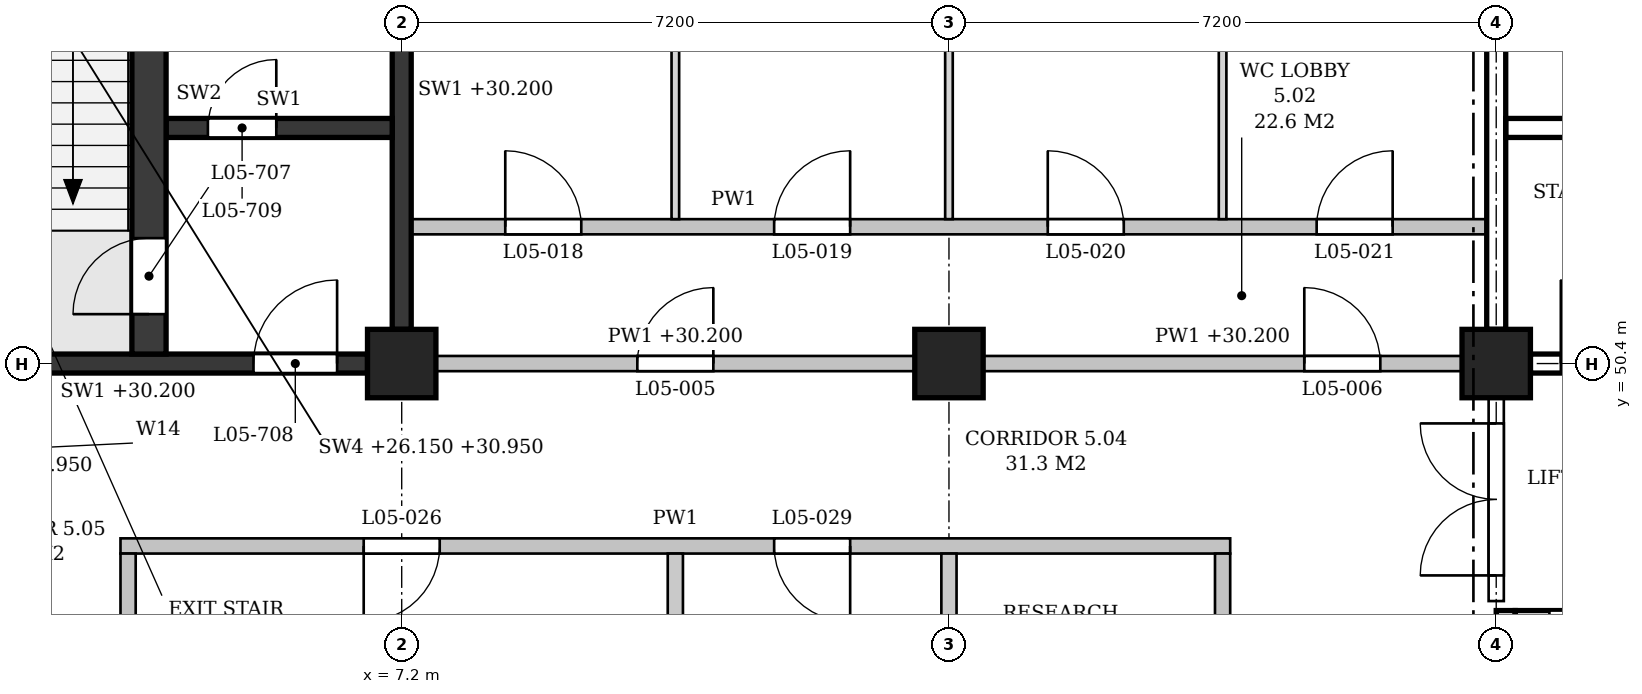
"""IFC4 building model, lengths in metres.
Left out: names, types, materials, properties, quantities, classifications, styles, units other than length and angle.
Written with IfcOpenShell. Run it as: python <this file> out.ifc"""

import sys

from ifc_helpers import new_model, si_unit, direction, frame, frame_2d, origin, origin_2d, place, context, subcontext, project, spatial, polyline, rectangle, outline, extrude, element, fill, save


model = new_model("IFC4")
c1 = context("Model", 3, precision=1e-05, world=origin(), true_north=direction((0.0, 1.0)))
c2 = subcontext(c1, "Body", "Model", "MODEL_VIEW")
j1 = project(units=[si_unit("LENGTHUNIT", "METRE"), si_unit("PLANEANGLEUNIT", "RADIAN")], contexts=[c1])
p1 = place(None, origin())
s1 = spatial("IfcSite", under=j1, at=p1, CompositionType="ELEMENT")
p2 = place(p1, origin())
s2 = spatial("IfcBuilding", under=s1, at=p2, CompositionType="ELEMENT")
p3 = place(p2, frame((0.0, 0.0, 26.4)))
s3 = spatial("IfcBuildingStorey", under=s2, at=p3, CompositionType="ELEMENT", Elevation=26.4)
for number, where, z_axis, x_axis in (
    (1, (7.2, 50.4, 0.0), (0.0, 0.0, 1.0), (1.0, 0.0, 0.0)),
    (2, (14.4, 50.4, 0.0), (0.0, 0.0, 1.0), (1.0, 0.0, 0.0)),
    (3, (21.6, 50.4, 0.0), (0.0, 0.0, 1.0), (1.0, 0.0, 0.0)),
):
    element("IfcColumn", number, at=place(p3, frame(where, z_axis=z_axis, x_axis=x_axis)), inside=s3, PredefinedType="COLUMN", context=c2, shape_type="SweptSolid", body=[
        extrude(rectangle(XDim=0.9, YDim=0.9, at=origin_2d()), origin(), (0.0, 0.0, 1.0), 4.8),
    ])
p4 = place(p3, frame((0.45, 50.4, 0.0), z_axis=(0.0, 0.0, 1.0), x_axis=(1.0, 0.0, 0.0)))
e4 = element("IfcWall", 4, at=p4, inside=s3, PredefinedType="SHEAR", context=c2, shape_type="SweptSolid", body=[
    extrude(rectangle(XDim=6.3, YDim=0.25, at=frame_2d((3.15, 0.0))), origin(), (0.0, 0.0, 1.0), 3.8),
])
p5 = place(p4, frame((4.8, 0.0, 0.0)))
e5 = element("IfcOpeningElement", 5, at=p5, cuts=e4, PredefinedType="OPENING", context=c2, shape_type="SweptSolid", body=[
    extrude(rectangle(XDim=1.1, YDim=2.1, at=frame_2d((0.55, 1.05))), frame((0.0, 0.135, 0.0), z_axis=(0.0, -1.0, 0.0), x_axis=(1.0, 0.0, 0.0)), (0.0, 0.0, 1.0), 0.27),
])
p6 = place(p3, frame((7.2, 50.85, 0.0), z_axis=(0.0, 0.0, 1.0), x_axis=(0.0, 1.0, 0.0)))
e6 = element("IfcWall", 6, at=p6, inside=s3, PredefinedType="SHEAR", context=c2, shape_type="SweptSolid", body=[
    extrude(rectangle(XDim=6.3, YDim=0.25, at=frame_2d((3.15, 0.0))), origin(), (0.0, 0.0, 1.0), 3.8),
])
p7 = place(p3, frame((3.875, 50.525, 0.0), z_axis=(0.0, 0.0, 1.0), x_axis=(0.0, 1.0, 0.0)))
e7 = element("IfcWall", 7, at=p7, inside=s3, PredefinedType="SHEAR", context=c2, shape_type="SweptSolid", body=[
    extrude(rectangle(XDim=6.85, YDim=0.45, at=frame_2d((3.425, 0.0))), origin(), (0.0, 0.0, 1.0), 4.55),
])
p8 = place(p7, frame((0.525, 0.0, 0.0)))
e8 = element("IfcOpeningElement", 8, at=p8, cuts=e7, PredefinedType="OPENING", context=c2, shape_type="SweptSolid", body=[
    extrude(rectangle(XDim=1.0, YDim=2.1, at=frame_2d((0.5, 1.05))), frame((0.0, 0.235, 0.0), z_axis=(0.0, -1.0, 0.0), x_axis=(1.0, 0.0, 0.0)), (0.0, 0.0, 1.0), 0.47),
])
p9 = place(p3, frame((4.1, 53.5, 0.0), z_axis=(0.0, 0.0, 1.0), x_axis=(1.0, 0.0, 0.0)))
e9 = element("IfcWall", 9, at=p9, inside=s3, PredefinedType="SHEAR", context=c2, shape_type="SweptSolid", body=[
    extrude(rectangle(XDim=2.975, YDim=0.25, at=frame_2d((1.487, 0.0))), origin(), (0.0, 0.0, 1.0), 4.55),
])
p10 = place(p9, frame((0.55, 0.0, 0.0)))
e10 = element("IfcOpeningElement", 10, at=p10, cuts=e9, PredefinedType="OPENING", context=c2, shape_type="SweptSolid", body=[
    extrude(rectangle(XDim=0.9, YDim=2.1, at=frame_2d((0.45, 1.05))), frame((0.0, 0.135, 0.0), z_axis=(0.0, -1.0, 0.0), x_axis=(1.0, 0.0, 0.0)), (0.0, 0.0, 1.0), 0.27),
])
p11 = place(p3, frame((22.05, 50.4, 0.0), z_axis=(0.0, 0.0, 1.0), x_axis=(1.0, 0.0, 0.0)))
e11 = element("IfcWall", 11, at=p11, inside=s3, PredefinedType="SHEAR", context=c2, shape_type="SweptSolid", body=[
    extrude(rectangle(XDim=6.3, YDim=0.25, at=frame_2d((3.15, 0.0))), origin(), (0.0, 0.0, 1.0), 3.8),
])
p12 = place(p11, frame((0.4, 0.0, 0.0)))
e12 = element("IfcOpeningElement", 12, at=p12, cuts=e11, PredefinedType="OPENING", context=c2, shape_type="SweptSolid", body=[
    extrude(rectangle(XDim=1.1, YDim=2.1, at=frame_2d((0.55, 1.05))), frame((0.0, 0.135, 0.0), z_axis=(0.0, -1.0, 0.0), x_axis=(1.0, 0.0, 0.0)), (0.0, 0.0, 1.0), 0.27),
])
p13 = place(p3, frame((21.6, 50.85, 0.0), z_axis=(0.0, 0.0, 1.0), x_axis=(0.0, 1.0, 0.0)))
e13 = element("IfcWall", 13, at=p13, inside=s3, PredefinedType="SHEAR", context=c2, shape_type="SweptSolid", body=[
    extrude(rectangle(XDim=6.3, YDim=0.25, at=frame_2d((3.15, 0.0))), origin(), (0.0, 0.0, 1.0), 3.8),
])
p14 = place(p3, frame((21.725, 53.5, 0.0), z_axis=(0.0, 0.0, 1.0), x_axis=(1.0, 0.0, 0.0)))
e14 = element("IfcWall", 14, at=p14, inside=s3, PredefinedType="SHEAR", context=c2, shape_type="SweptSolid", body=[
    extrude(rectangle(XDim=2.975, YDim=0.25, at=frame_2d((1.487, 0.0))), origin(), (0.0, 0.0, 1.0), 4.55),
])
p15 = place(p14, frame((1.525, 0.0, 0.0)))
e15 = element("IfcOpeningElement", 15, at=p15, cuts=e14, PredefinedType="OPENING", context=c2, shape_type="SweptSolid", body=[
    extrude(rectangle(XDim=0.9, YDim=2.1, at=frame_2d((0.45, 1.05))), frame((0.0, 0.135, 0.0), z_axis=(0.0, -1.0, 0.0), x_axis=(1.0, 0.0, 0.0)), (0.0, 0.0, 1.0), 0.27),
])
p16 = place(p3, frame((21.725, 43.65, -0.25), z_axis=(0.0, 0.0, 1.0), x_axis=(0.0, 1.0, 0.0)))
e16 = element("IfcWall", 16, at=p16, inside=s3, PredefinedType="SHEAR", context=c2, shape_type="SweptSolid", body=[
    extrude(rectangle(XDim=3.5, YDim=0.25, at=frame_2d((1.75, 0.0))), origin(), (0.0, 0.0, 1.0), 4.05),
])
p17 = place(p3, frame((21.85, 47.025, -0.25), z_axis=(0.0, 0.0, 1.0), x_axis=(1.0, 0.0, 0.0)))
e17 = element("IfcWall", 17, at=p17, inside=s3, PredefinedType="SHEAR", context=c2, shape_type="SweptSolid", body=[
    extrude(rectangle(XDim=2.0, YDim=0.25, at=frame_2d((1.0, 0.0))), origin(), (0.0, 0.0, 1.0), 4.8),
])
p18 = place(p17, frame((0.45, 0.0, 0.25)))
e18 = element("IfcOpeningElement", 18, at=p18, cuts=e17, PredefinedType="OPENING", context=c2, shape_type="SweptSolid", body=[
    extrude(rectangle(XDim=1.1, YDim=2.1, at=frame_2d((0.55, 1.05))), frame((0.0, 0.135, 0.0), z_axis=(0.0, -1.0, 0.0), x_axis=(1.0, 0.0, 0.0)), (0.0, 0.0, 1.0), 0.27),
])
p19 = place(p3, frame((3.5, 48.0, 0.0), z_axis=(0.0, 0.0, 1.0), x_axis=(1.0, 0.0, 0.0)))
e19 = element("IfcWall", 19, at=p19, inside=s3, PredefinedType="PARTITIONING", context=c2, shape_type="SweptSolid", body=[
    extrude(outline(polyline([(0.0, 0.0), (14.6, 0.0), (14.6, 4.55), (11.15, 4.55), (11.15, 3.8), (10.65, 3.8), (10.65, 4.55), (3.95, 4.55), (3.95, 3.8), (3.45, 3.8), (3.45, 4.55), (0.0, 4.55), (0.0, 0.0)])), frame((0.0, 0.1, 0.0), z_axis=(0.0, -1.0, 0.0), x_axis=(1.0, 0.0, 0.0)), (0.0, 0.0, 1.0), 0.2),
])
p20 = place(p19, frame((3.2, 0.0, 0.0)))
e20 = element("IfcOpeningElement", 20, at=p20, cuts=e19, PredefinedType="OPENING", context=c2, shape_type="SweptSolid", body=[
    extrude(rectangle(XDim=1.0, YDim=2.1, at=frame_2d((0.5, 1.05))), frame((0.0, 0.11, 0.0), z_axis=(0.0, -1.0, 0.0), x_axis=(1.0, 0.0, 0.0)), (0.0, 0.0, 1.0), 0.22),
])
p21 = place(p19, frame((8.6, 0.0, 0.0)))
e21 = element("IfcOpeningElement", 21, at=p21, cuts=e19, PredefinedType="OPENING", context=c2, shape_type="SweptSolid", body=[
    extrude(rectangle(XDim=1.0, YDim=2.1, at=frame_2d((0.5, 1.05))), frame((0.0, 0.11, 0.0), z_axis=(0.0, -1.0, 0.0), x_axis=(1.0, 0.0, 0.0)), (0.0, 0.0, 1.0), 0.22),
])
p22 = place(p3, frame((7.65, 50.4, 0.0), z_axis=(0.0, 0.0, 1.0), x_axis=(1.0, 0.0, 0.0)))
e22 = element("IfcWall", 22, at=p22, inside=s3, PredefinedType="PARTITIONING", context=c2, shape_type="SweptSolid", body=[
    extrude(rectangle(XDim=6.3, YDim=0.2, at=frame_2d((3.15, 0.0))), origin(), (0.0, 0.0, 1.0), 3.8),
])
p23 = place(p22, frame((2.65, 0.0, 0.0)))
e23 = element("IfcOpeningElement", 23, at=p23, cuts=e22, PredefinedType="OPENING", context=c2, shape_type="SweptSolid", body=[
    extrude(rectangle(XDim=1.0, YDim=2.1, at=frame_2d((0.5, 1.05))), frame((0.0, 0.11, 0.0), z_axis=(0.0, -1.0, 0.0), x_axis=(1.0, 0.0, 0.0)), (0.0, 0.0, 1.0), 0.22),
])
p24 = place(p3, frame((14.85, 50.4, 0.0), z_axis=(0.0, 0.0, 1.0), x_axis=(1.0, 0.0, 0.0)))
e24 = element("IfcWall", 24, at=p24, inside=s3, PredefinedType="PARTITIONING", context=c2, shape_type="SweptSolid", body=[
    extrude(rectangle(XDim=6.3, YDim=0.2, at=frame_2d((3.15, 0.0))), origin(), (0.0, 0.0, 1.0), 3.8),
])
p25 = place(p24, frame((4.225, 0.0, 0.0)))
e25 = element("IfcOpeningElement", 25, at=p25, cuts=e24, PredefinedType="OPENING", context=c2, shape_type="SweptSolid", body=[
    extrude(rectangle(XDim=1.0, YDim=2.1, at=frame_2d((0.5, 1.05))), frame((0.0, 0.11, 0.0), z_axis=(0.0, -1.0, 0.0), x_axis=(1.0, 0.0, 0.0)), (0.0, 0.0, 1.0), 0.22),
])
p26 = place(p3, frame((7.325, 52.2, 0.0), z_axis=(0.0, 0.0, 1.0), x_axis=(1.0, 0.0, 0.0)))
e26 = element("IfcWall", 26, at=p26, inside=s3, PredefinedType="PARTITIONING", context=c2, shape_type="SweptSolid", body=[
    extrude(outline(polyline([(0.0, 0.0), (14.15, 0.0), (14.15, 3.8), (14.025, 3.8), (14.025, 4.55), (7.325, 4.55), (7.325, 3.8), (6.825, 3.8), (6.825, 4.55), (0.125, 4.55), (0.125, 3.8), (0.0, 3.8), (0.0, 0.0)])), frame((0.0, 0.1, 0.0), z_axis=(0.0, -1.0, 0.0), x_axis=(1.0, 0.0, 0.0)), (0.0, 0.0, 1.0), 0.2),
])
p27 = place(p26, frame((1.238, 0.0, 0.0)))
e27 = element("IfcOpeningElement", 27, at=p27, cuts=e26, PredefinedType="OPENING", context=c2, shape_type="SweptSolid", body=[
    extrude(rectangle(XDim=1.0, YDim=2.1, at=frame_2d((0.5, 1.05))), frame((0.0, 0.11, 0.0), z_axis=(0.0, -1.0, 0.0), x_axis=(1.0, 0.0, 0.0)), (0.0, 0.0, 1.0), 0.22),
])
p28 = place(p26, frame((4.775, 0.0, 0.0)))
e28 = element("IfcOpeningElement", 28, at=p28, cuts=e26, PredefinedType="OPENING", context=c2, shape_type="SweptSolid", body=[
    extrude(rectangle(XDim=1.0, YDim=2.1, at=frame_2d((0.5, 1.05))), frame((0.0, 0.11, 0.0), z_axis=(0.0, -1.0, 0.0), x_axis=(1.0, 0.0, 0.0)), (0.0, 0.0, 1.0), 0.22),
])
p29 = place(p26, frame((8.375, 0.0, 0.0)))
e29 = element("IfcOpeningElement", 29, at=p29, cuts=e26, PredefinedType="OPENING", context=c2, shape_type="SweptSolid", body=[
    extrude(rectangle(XDim=1.0, YDim=2.1, at=frame_2d((0.5, 1.05))), frame((0.0, 0.11, 0.0), z_axis=(0.0, -1.0, 0.0), x_axis=(1.0, 0.0, 0.0)), (0.0, 0.0, 1.0), 0.22),
])
p30 = place(p26, frame((11.913, 0.0, 0.0)))
e30 = element("IfcOpeningElement", 30, at=p30, cuts=e26, PredefinedType="OPENING", context=c2, shape_type="SweptSolid", body=[
    extrude(rectangle(XDim=1.0, YDim=2.1, at=frame_2d((0.5, 1.05))), frame((0.0, 0.11, 0.0), z_axis=(0.0, -1.0, 0.0), x_axis=(1.0, 0.0, 0.0)), (0.0, 0.0, 1.0), 0.22),
])
p31 = place(p3, frame((3.6, 46.8, 0.0), z_axis=(0.0, 0.0, 1.0), x_axis=(0.0, 1.0, 0.0)))
e31 = element("IfcWall", 31, at=p31, inside=s3, PredefinedType="PARTITIONING", context=c2, shape_type="SweptSolid", body=[
    extrude(rectangle(XDim=1.1, YDim=0.2, at=frame_2d((0.55, 0.0))), origin(), (0.0, 0.0, 1.0), 4.55),
])
p32 = place(p3, frame((10.8, 36.15, 0.0), z_axis=(0.0, 0.0, 1.0), x_axis=(0.0, 1.0, 0.0)))
e32 = element("IfcWall", 32, at=p32, inside=s3, PredefinedType="PARTITIONING", context=c2, shape_type="SweptSolid", body=[
    extrude(outline(polyline([(0.0, 0.0), (11.75, 0.0), (11.75, 4.55), (7.3, 4.55), (7.3, 3.8), (6.8, 3.8), (6.8, 4.55), (0.1, 4.55), (0.1, 3.95), (0.0, 3.95), (0.0, 0.0)])), frame((0.0, 0.1, 0.0), z_axis=(0.0, -1.0, 0.0), x_axis=(1.0, 0.0, 0.0)), (0.0, 0.0, 1.0), 0.2),
])
p33 = place(p3, frame((10.8, 52.3, 0.0), z_axis=(0.0, 0.0, 1.0), x_axis=(0.0, 1.0, 0.0)))
e33 = element("IfcWall", 33, at=p33, inside=s3, PredefinedType="PARTITIONING", context=c2, shape_type="SweptSolid", body=[
    extrude(rectangle(XDim=5.15, YDim=0.1, at=frame_2d((2.575, 0.0))), origin(), (0.0, 0.0, 1.0), 3.8),
])
p34 = place(p3, frame((14.4, 43.65, 0.0), z_axis=(0.0, 0.0, 1.0), x_axis=(0.0, 1.0, 0.0)))
e34 = element("IfcWall", 34, at=p34, inside=s3, PredefinedType="PARTITIONING", context=c2, shape_type="SweptSolid", body=[
    extrude(rectangle(XDim=4.25, YDim=0.2, at=frame_2d((2.125, 0.0))), origin(), (0.0, 0.0, 1.0), 3.8),
])
p35 = place(p3, frame((14.4, 52.3, 0.0), z_axis=(0.0, 0.0, 1.0), x_axis=(0.0, 1.0, 0.0)))
e35 = element("IfcWall", 35, at=p35, inside=s3, PredefinedType="PARTITIONING", context=c2, shape_type="SweptSolid", body=[
    extrude(rectangle(XDim=4.85, YDim=0.1, at=frame_2d((2.425, 0.0))), origin(), (0.0, 0.0, 1.0), 3.8),
])
p36 = place(p3, frame((18.0, 40.9, 0.0), z_axis=(0.0, 0.0, 1.0), x_axis=(0.0, 1.0, 0.0)))
e36 = element("IfcWall", 36, at=p36, inside=s3, PredefinedType="PARTITIONING", context=c2, shape_type="SweptSolid", body=[
    extrude(outline(polyline([(0.0, 0.0), (7.0, 0.0), (7.0, 4.55), (2.55, 4.55), (2.55, 3.8), (2.05, 3.8), (2.05, 4.55), (0.0, 4.55), (0.0, 0.0)])), frame((0.0, 0.1, 0.0), z_axis=(0.0, -1.0, 0.0), x_axis=(1.0, 0.0, 0.0)), (0.0, 0.0, 1.0), 0.2),
])
p37 = place(p36, frame((3.0, 0.0, 0.0)))
e37 = element("IfcOpeningElement", 37, at=p37, cuts=e36, PredefinedType="OPENING", context=c2, shape_type="SweptSolid", body=[
    extrude(rectangle(XDim=1.0, YDim=2.1, at=frame_2d((0.5, 1.05))), frame((0.0, 0.11, 0.0), z_axis=(0.0, -1.0, 0.0), x_axis=(1.0, 0.0, 0.0)), (0.0, 0.0, 1.0), 0.22),
])
p38 = place(p3, frame((18.0, 52.3, 0.0), z_axis=(0.0, 0.0, 1.0), x_axis=(0.0, 1.0, 0.0)))
e38 = element("IfcWall", 38, at=p38, inside=s3, PredefinedType="PARTITIONING", context=c2, shape_type="SweptSolid", body=[
    extrude(rectangle(XDim=5.15, YDim=0.1, at=frame_2d((2.575, 0.0))), origin(), (0.0, 0.0, 1.0), 3.8),
])
p39 = place(p3, frame((21.6, 47.275, 0.0), z_axis=(0.0, 0.0, 1.0), x_axis=(0.0, 1.0, 0.0)))
e39 = element("IfcWall", 39, at=p39, inside=s3, PredefinedType="PARTITIONING", context=c2, shape_type="SweptSolid", body=[
    extrude(rectangle(XDim=2.675, YDim=0.2, at=frame_2d((1.337, 0.0))), origin(), (0.0, 0.0, 1.0), 3.8),
])
p40 = place(p39, frame((0.337, 0.0, 0.0)))
e40 = element("IfcOpeningElement", 40, at=p40, cuts=e39, PredefinedType="OPENING", context=c2, shape_type="SweptSolid", body=[
    extrude(rectangle(XDim=2.0, YDim=2.4, at=frame_2d((1.0, 1.2))), frame((0.0, 0.11, 0.0), z_axis=(0.0, -1.0, 0.0), x_axis=(1.0, 0.0, 0.0)), (0.0, 0.0, 1.0), 0.22),
])
p41 = place(p8, origin())
e41 = element("IfcDoor", 41, at=p41, inside=s3, OperationType="SINGLE_SWING_LEFT", PredefinedType="DOOR", context=c2, shape_type="SweptSolid", body=[
    extrude(rectangle(XDim=1.0, YDim=2.1, at=frame_2d((0.5, 1.05))), frame((0.0, 0.025, 0.0), z_axis=(0.0, -1.0, 0.0), x_axis=(1.0, 0.0, 0.0)), (0.0, 0.0, 1.0), 0.05),
])
fill(e8, e41)
p42 = place(p5, origin())
e42 = element("IfcDoor", 42, at=p42, inside=s3, OperationType="SINGLE_SWING_RIGHT", PredefinedType="DOOR", context=c2, shape_type="SweptSolid", body=[
    extrude(rectangle(XDim=1.1, YDim=2.1, at=frame_2d((0.55, 1.05))), frame((0.0, 0.025, 0.0), z_axis=(0.0, -1.0, 0.0), x_axis=(1.0, 0.0, 0.0)), (0.0, 0.0, 1.0), 0.05),
])
fill(e5, e42)
p43 = place(p10, origin())
e43 = element("IfcDoor", 43, at=p43, inside=s3, OperationType="SINGLE_SWING_RIGHT", PredefinedType="DOOR", context=c2, shape_type="SweptSolid", body=[
    extrude(rectangle(XDim=0.9, YDim=2.1, at=frame_2d((0.45, 1.05))), frame((0.0, 0.025, 0.0), z_axis=(0.0, -1.0, 0.0), x_axis=(1.0, 0.0, 0.0)), (0.0, 0.0, 1.0), 0.05),
])
fill(e10, e43)
p44 = place(p12, origin())
e44 = element("IfcDoor", 44, at=p44, inside=s3, OperationType="SINGLE_SWING_LEFT", PredefinedType="DOOR", context=c2, shape_type="SweptSolid", body=[
    extrude(rectangle(XDim=1.1, YDim=2.1, at=frame_2d((0.55, 1.05))), frame((0.0, 0.025, 0.0), z_axis=(0.0, -1.0, 0.0), x_axis=(1.0, 0.0, 0.0)), (0.0, 0.0, 1.0), 0.05),
])
fill(e12, e44)
p45 = place(p40, origin())
e45 = element("IfcDoor", 45, at=p45, inside=s3, OperationType="DOUBLE_DOOR_SINGLE_SWING", PredefinedType="DOOR", context=c2, shape_type="SweptSolid", body=[
    extrude(rectangle(XDim=2.0, YDim=2.4, at=frame_2d((1.0, 1.2))), frame((0.0, 0.025, 0.0), z_axis=(0.0, -1.0, 0.0), x_axis=(1.0, 0.0, 0.0)), (0.0, 0.0, 1.0), 0.05),
])
fill(e40, e45)
p46 = place(p23, origin())
e46 = element("IfcDoor", 46, at=p46, inside=s3, OperationType="SINGLE_SWING_RIGHT", PredefinedType="DOOR", context=c2, shape_type="SweptSolid", body=[
    extrude(rectangle(XDim=1.0, YDim=2.1, at=frame_2d((0.5, 1.05))), frame((0.0, 0.025, 0.0), z_axis=(0.0, -1.0, 0.0), x_axis=(1.0, 0.0, 0.0)), (0.0, 0.0, 1.0), 0.05),
])
fill(e23, e46)
p47 = place(p25, origin())
e47 = element("IfcDoor", 47, at=p47, inside=s3, OperationType="SINGLE_SWING_LEFT", PredefinedType="DOOR", context=c2, shape_type="SweptSolid", body=[
    extrude(rectangle(XDim=1.0, YDim=2.1, at=frame_2d((0.5, 1.05))), frame((0.0, 0.025, 0.0), z_axis=(0.0, -1.0, 0.0), x_axis=(1.0, 0.0, 0.0)), (0.0, 0.0, 1.0), 0.05),
])
fill(e25, e47)
p48 = place(p27, origin())
e48 = element("IfcDoor", 48, at=p48, inside=s3, OperationType="SINGLE_SWING_LEFT", PredefinedType="DOOR", context=c2, shape_type="SweptSolid", body=[
    extrude(rectangle(XDim=1.0, YDim=2.1, at=frame_2d((0.5, 1.05))), frame((0.0, 0.025, 0.0), z_axis=(0.0, -1.0, 0.0), x_axis=(1.0, 0.0, 0.0)), (0.0, 0.0, 1.0), 0.05),
])
fill(e27, e48)
p49 = place(p28, origin())
e49 = element("IfcDoor", 49, at=p49, inside=s3, OperationType="SINGLE_SWING_RIGHT", PredefinedType="DOOR", context=c2, shape_type="SweptSolid", body=[
    extrude(rectangle(XDim=1.0, YDim=2.1, at=frame_2d((0.5, 1.05))), frame((0.0, 0.025, 0.0), z_axis=(0.0, -1.0, 0.0), x_axis=(1.0, 0.0, 0.0)), (0.0, 0.0, 1.0), 0.05),
])
fill(e28, e49)
p50 = place(p29, origin())
e50 = element("IfcDoor", 50, at=p50, inside=s3, OperationType="SINGLE_SWING_LEFT", PredefinedType="DOOR", context=c2, shape_type="SweptSolid", body=[
    extrude(rectangle(XDim=1.0, YDim=2.1, at=frame_2d((0.5, 1.05))), frame((0.0, 0.025, 0.0), z_axis=(0.0, -1.0, 0.0), x_axis=(1.0, 0.0, 0.0)), (0.0, 0.0, 1.0), 0.05),
])
fill(e29, e50)
p51 = place(p30, origin())
e51 = element("IfcDoor", 51, at=p51, inside=s3, OperationType="SINGLE_SWING_RIGHT", PredefinedType="DOOR", context=c2, shape_type="SweptSolid", body=[
    extrude(rectangle(XDim=1.0, YDim=2.1, at=frame_2d((0.5, 1.05))), frame((0.0, 0.025, 0.0), z_axis=(0.0, -1.0, 0.0), x_axis=(1.0, 0.0, 0.0)), (0.0, 0.0, 1.0), 0.05),
])
fill(e30, e51)
p52 = place(p20, frame((1.0, 0.0, 0.0), z_axis=(0.0, 0.0, 1.0), x_axis=(-1.0, 0.0, 0.0)))
e52 = element("IfcDoor", 52, at=p52, inside=s3, OperationType="SINGLE_SWING_RIGHT", PredefinedType="DOOR", context=c2, shape_type="SweptSolid", body=[
    extrude(rectangle(XDim=1.0, YDim=2.1, at=frame_2d((0.5, 1.05))), frame((0.0, 0.025, 0.0), z_axis=(0.0, -1.0, 0.0), x_axis=(1.0, 0.0, 0.0)), (0.0, 0.0, 1.0), 0.05),
])
fill(e20, e52)
p53 = place(p21, frame((1.0, 0.0, 0.0), z_axis=(0.0, 0.0, 1.0), x_axis=(-1.0, 0.0, 0.0)))
e53 = element("IfcDoor", 53, at=p53, inside=s3, OperationType="SINGLE_SWING_LEFT", PredefinedType="DOOR", context=c2, shape_type="SweptSolid", body=[
    extrude(rectangle(XDim=1.0, YDim=2.1, at=frame_2d((0.5, 1.05))), frame((0.0, 0.025, 0.0), z_axis=(0.0, -1.0, 0.0), x_axis=(1.0, 0.0, 0.0)), (0.0, 0.0, 1.0), 0.05),
])
fill(e21, e53)
save(model, sys.argv[1])
